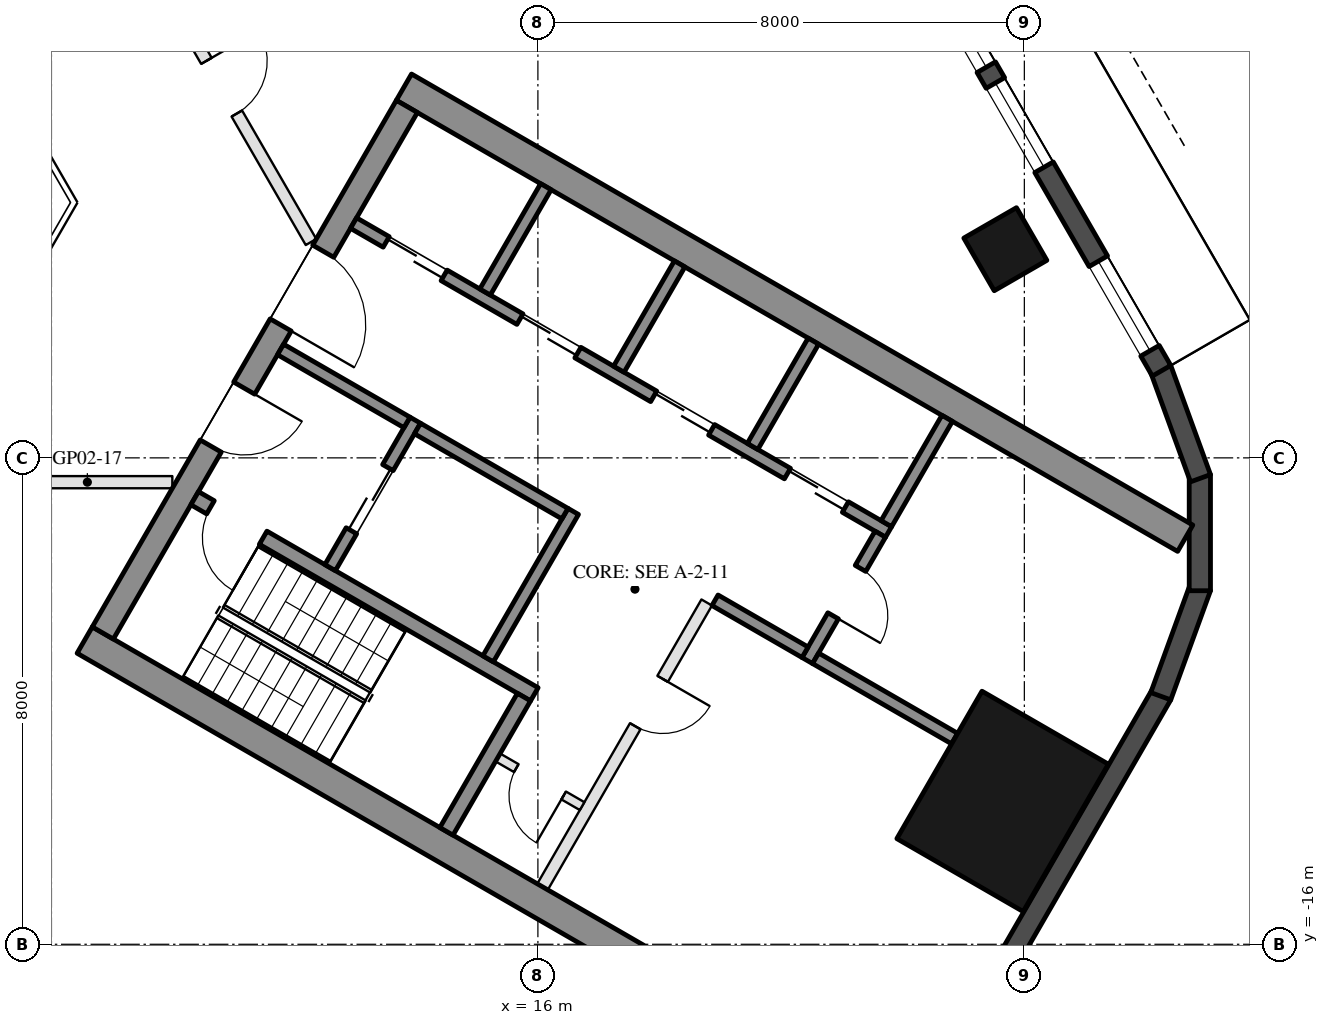
"""IFC4 building model, lengths in metres.
Left out: names, types, materials, properties, quantities, classifications, styles, units other than length and angle.
Written with IfcOpenShell. Run it as: python <this file> out.ifc"""

import sys

from ifc_helpers import new_model, si_unit, direction, frame, frame_2d, origin, origin_2d, place, context, subcontext, project, spatial, rectangle, hollow_rectangle, extrude, element, fill, save


model = new_model("IFC4")
c1 = context("Model", 3, precision=1e-05, world=origin(), true_north=direction((0.0, 1.0)))
c2 = subcontext(c1, "Body", "Model", "MODEL_VIEW")
j1 = project(units=[si_unit("LENGTHUNIT", "METRE"), si_unit("PLANEANGLEUNIT", "RADIAN")], contexts=[c1])
p1 = place(None, origin())
s1 = spatial("IfcSite", under=j1, at=p1, CompositionType="ELEMENT")
p2 = place(p1, origin())
s2 = spatial("IfcBuilding", under=s1, at=p2, CompositionType="ELEMENT")
p3 = place(p2, frame((0.0, 0.0, 53.9)))
s3 = spatial("IfcBuildingStorey", under=s2, at=p3, CompositionType="ELEMENT", Elevation=53.9)
p4 = place(p3, frame((23.688, -4.568, 0.0), z_axis=(0.0, 0.0, 1.0), x_axis=(-0.5, 0.866025403784, 0.0)))
e1 = element("IfcColumn", 1, at=p4, inside=s3, PredefinedType="COLUMN", context=c2, shape_type="SweptSolid", body=[
    extrude(hollow_rectangle(XDim=1.0, YDim=1.0, WallThickness=0.045, at=origin_2d()), origin(), (0.0, 0.0, 1.0), 3.7),
])
p5 = place(p3, frame((23.643, -13.65, 0.0), z_axis=(0.0, 0.0, 1.0), x_axis=(0.5, 0.866025403784, 0.0)))
e2 = element("IfcColumn", 2, at=p5, inside=s3, PredefinedType="COLUMN", context=c2, shape_type="SweptSolid", body=[
    extrude(hollow_rectangle(XDim=2.8, YDim=2.4, WallThickness=0.07, at=origin_2d()), origin(), (0.0, 0.0, 1.0), 3.7),
])
p6 = place(p3, frame((23.427, -16.792, 0.0), z_axis=(0.0, 0.0, 1.0), x_axis=(0.500018773155, 0.866014564827, 0.0)))
e3 = element("IfcWall", 3, at=p6, inside=s3, PredefinedType="SOLIDWALL", context=c2, shape_type="SweptSolid", body=[
    extrude(rectangle(XDim=5.658, YDim=0.35, at=frame_2d((2.829, 0.0))), origin(), (0.0, 0.0, 1.0), 3.55),
])
for number, where, z_axis, x_axis in (
    (4, (26.244, -11.92, 0.0), (0.0, 0.0, 1.0), (0.342, 0.94, 0.0)),
    (5, (26.886, -10.185, 0.0), (0.0, 0.0, 1.0), (0.0, 1.0, 0.0)),
    (6, (26.897, -8.335, 0.0), (0.0, 0.0, 1.0), (-0.342, 0.94, 0.0)),
):
    element("IfcWall", number, at=place(p3, frame(where, z_axis=z_axis, x_axis=x_axis)), inside=s3, PredefinedType="SOLIDWALL", context=c2, shape_type="SweptSolid", body=[
        extrude(rectangle(XDim=1.91, YDim=0.35, at=frame_2d((0.955, 0.0))), origin(), (0.0, 0.0, 1.0), 3.55),
    ])
p7 = place(p3, frame((26.257, -6.567, 0.0), z_axis=(0.0, 0.0, 1.0), x_axis=(-0.500023526245, 0.866011820475, 0.0)))
e7 = element("IfcWall", 7, at=p7, inside=s3, PredefinedType="SOLIDWALL", context=c2, shape_type="SweptSolid", body=[
    extrude(rectangle(XDim=11.816, YDim=0.35, at=frame_2d((5.908, 0.0))), origin(), (0.0, 0.0, 1.0), 3.55),
])
p8 = place(p7, frame((0.38, 0.0, 0.3)))
e8 = element("IfcOpeningElement", 8, at=p8, cuts=e7, PredefinedType="OPENING", context=c2, shape_type="SweptSolid", body=[
    extrude(rectangle(XDim=1.7, YDim=2.65, at=frame_2d((0.85, 1.325))), frame((0.0, 0.185, 0.0), z_axis=(0.0, -1.0, 0.0), x_axis=(1.0, 0.0, 0.0)), (0.0, 0.0, 1.0), 0.37),
])
p9 = place(p7, frame((7.666, 0.0, 0.0)))
e9 = element("IfcOpeningElement", 9, at=p9, cuts=e7, PredefinedType="OPENING", context=c2, shape_type="SweptSolid", body=[
    extrude(rectangle(XDim=2.4, YDim=2.4, at=frame_2d((1.2, 1.2))), frame((0.0, 0.185, 0.0), z_axis=(0.0, -1.0, 0.0), x_axis=(1.0, 0.0, 0.0)), (0.0, 0.0, 1.0), 0.37),
])
p10 = place(p7, frame((3.865, 0.0, 0.3)))
e10 = element("IfcOpeningElement", 10, at=p10, cuts=e7, PredefinedType="OPENING", context=c2, shape_type="SweptSolid", body=[
    extrude(rectangle(XDim=1.6, YDim=2.65, at=frame_2d((0.8, 1.325))), frame((0.0, 0.185, 0.0), z_axis=(0.0, -1.0, 0.0), x_axis=(1.0, 0.0, 0.0)), (0.0, 0.0, 1.0), 0.37),
])
p11 = place(p7, frame((5.765, 0.0, 0.3)))
e11 = element("IfcOpeningElement", 11, at=p11, cuts=e7, PredefinedType="OPENING", context=c2, shape_type="SweptSolid", body=[
    extrude(rectangle(XDim=1.6, YDim=2.65, at=frame_2d((0.8, 1.325))), frame((0.0, 0.185, 0.0), z_axis=(0.0, -1.0, 0.0), x_axis=(1.0, 0.0, 0.0)), (0.0, 0.0, 1.0), 0.37),
])
for number, where, z_axis, x_axis in (
    (12, (8.547, -10.997, 0.0), (0.0, 0.0, 1.0), (0.866, -0.5, 0.0)),
    (13, (13.797, -1.903, 0.0), (0.0, 0.0, 1.0), (0.866, -0.5, 0.0)),
):
    element("IfcWall", number, at=place(p3, frame(where, z_axis=z_axis, x_axis=x_axis)), inside=s3, PredefinedType="SHEAR", context=c2, shape_type="SweptSolid", body=[
        extrude(rectangle(XDim=14.837, YDim=0.5, at=frame_2d((7.418, 0.0))), origin(), (0.0, 0.0, 1.0), 3.5),
    ])
p12 = place(p3, frame((8.845, -10.88, 0.0), z_axis=(0.0, 0.0, 1.0), x_axis=(0.500004234368, 0.866022959057, 0.0)))
e14 = element("IfcWall", 14, at=p12, inside=s3, PredefinedType="SHEAR", context=c2, shape_type="SweptSolid", body=[
    extrude(rectangle(XDim=10.0, YDim=0.4, at=frame_2d((5.0, 0.0))), origin(), (0.0, 0.0, 1.0), 3.5),
])
p13 = place(p12, frame((3.55, 0.0, 0.0)))
e15 = element("IfcOpeningElement", 15, at=p13, cuts=e14, PredefinedType="OPENING", context=c2, shape_type="SweptSolid", body=[
    extrude(rectangle(XDim=1.1, YDim=2.1, at=frame_2d((0.55, 1.05))), frame((0.0, 0.21, 0.0), z_axis=(0.0, -1.0, 0.0), x_axis=(1.0, 0.0, 0.0)), (0.0, 0.0, 1.0), 0.42),
])
p14 = place(p12, frame((5.85, 0.0, 0.0)))
e16 = element("IfcOpeningElement", 16, at=p14, cuts=e14, PredefinedType="OPENING", context=c2, shape_type="SweptSolid", body=[
    extrude(rectangle(XDim=1.4, YDim=2.1, at=frame_2d((0.7, 1.05))), frame((0.0, 0.21, 0.0), z_axis=(0.0, -1.0, 0.0), x_axis=(1.0, 0.0, 0.0)), (0.0, 0.0, 1.0), 0.42),
])
p15 = place(p3, frame((10.356, -8.664, 0.0), z_axis=(0.0, 0.0, 1.0), x_axis=(0.866028629588, -0.499994412703, 0.0)))
e17 = element("IfcWall", 17, at=p15, inside=s3, PredefinedType="SHEAR", context=c2, shape_type="SweptSolid", body=[
    extrude(rectangle(XDim=6.45, YDim=0.25, at=frame_2d((3.225, 0.0))), origin(), (0.0, 0.0, 1.0), 3.5),
])
p16 = place(p15, frame((0.3, 0.0, 0.0)))
e18 = element("IfcOpeningElement", 18, at=p16, cuts=e17, PredefinedType="OPENING", context=c2, shape_type="SweptSolid", body=[
    extrude(rectangle(XDim=1.0, YDim=2.1, at=frame_2d((0.5, 1.05))), frame((0.0, 0.135, 0.0), z_axis=(0.0, -1.0, 0.0), x_axis=(1.0, 0.0, 0.0)), (0.0, 0.0, 1.0), 0.27),
])
p17 = place(p3, frame((14.496, -14.143, 0.0), z_axis=(0.0, 0.0, 1.0), x_axis=(0.500062241894, 0.865989465428, 0.0)))
e19 = element("IfcWall", 19, at=p17, inside=s3, PredefinedType="SHEAR", context=c2, shape_type="SweptSolid", body=[
    extrude(rectangle(XDim=2.55, YDim=0.25, at=frame_2d((1.275, 0.0))), origin(), (0.0, 0.0, 1.0), 3.5),
])
p18 = place(p3, frame((15.181, -11.305, 0.0), z_axis=(0.0, 0.0, 1.0), x_axis=(0.49994636267, 0.866056369097, 0.0)))
e20 = element("IfcWall", 20, at=p18, inside=s3, PredefinedType="SHEAR", context=c2, shape_type="SweptSolid", body=[
    extrude(rectangle(XDim=2.8, YDim=0.2, at=frame_2d((1.4, 0.0))), origin(), (0.0, 0.0, 1.0), 3.5),
])
p19 = place(p3, frame((12.583, -9.805, 0.0), z_axis=(0.0, 0.0, 1.0), x_axis=(0.49994636267, 0.866056369097, 0.0)))
e21 = element("IfcWall", 21, at=p19, inside=s3, PredefinedType="SHEAR", context=c2, shape_type="SweptSolid", body=[
    extrude(rectangle(XDim=2.8, YDim=0.2, at=frame_2d((1.4, 0.0))), origin(), (0.0, 0.0, 1.0), 3.5),
])
p20 = place(p19, frame((0.7, 0.0, 0.0)))
e22 = element("IfcOpeningElement", 22, at=p20, cuts=e21, PredefinedType="OPENING", context=c2, shape_type="SweptSolid", body=[
    extrude(rectangle(XDim=1.2, YDim=2.1, at=frame_2d((0.6, 1.05))), frame((0.0, 0.11, 0.0), z_axis=(0.0, -1.0, 0.0), x_axis=(1.0, 0.0, 0.0)), (0.0, 0.0, 1.0), 0.22),
])
p21 = place(p3, frame((11.768, -6.217, 0.0), z_axis=(0.0, 0.0, 1.0), x_axis=(0.866050077142, -0.499957262057, 0.0)))
e23 = element("IfcWall", 23, at=p21, inside=s3, PredefinedType="SHEAR", context=c2, shape_type="SweptSolid", body=[
    extrude(rectangle(XDim=2.4, YDim=0.2, at=frame_2d((1.2, 0.0))), origin(), (0.0, 0.0, 1.0), 3.5),
])
p22 = place(p3, frame((14.02, -7.517, 0.0), z_axis=(0.0, 0.0, 1.0), x_axis=(0.866034573852, -0.49998411664, 0.0)))
e24 = element("IfcWall", 24, at=p22, inside=s3, PredefinedType="SHEAR", context=c2, shape_type="SweptSolid", body=[
    extrude(rectangle(XDim=2.8, YDim=0.2, at=frame_2d((1.4, 0.0))), origin(), (0.0, 0.0, 1.0), 3.5),
])
p23 = place(p3, frame((12.968, -4.138, 0.0), z_axis=(0.0, 0.0, 1.0), x_axis=(0.866028328073, -0.49999493495, 0.0)))
e25 = element("IfcWall", 25, at=p23, inside=s3, PredefinedType="SHEAR", context=c2, shape_type="SweptSolid", body=[
    extrude(rectangle(XDim=10.16, YDim=0.2, at=frame_2d((5.08, 0.0))), origin(), (0.0, 0.0, 1.0), 3.5),
])
p24 = place(p23, frame((0.62, 0.0, 0.0)))
e26 = element("IfcOpeningElement", 26, at=p24, cuts=e25, PredefinedType="OPENING", context=c2, shape_type="SweptSolid", body=[
    extrude(rectangle(XDim=1.1, YDim=2.1, at=frame_2d((0.55, 1.05))), frame((0.0, 0.11, 0.0), z_axis=(0.0, -1.0, 0.0), x_axis=(1.0, 0.0, 0.0)), (0.0, 0.0, 1.0), 0.22),
])
p25 = place(p23, frame((3.16, 0.0, 0.0)))
e27 = element("IfcOpeningElement", 27, at=p25, cuts=e25, PredefinedType="OPENING", context=c2, shape_type="SweptSolid", body=[
    extrude(rectangle(XDim=1.1, YDim=2.1, at=frame_2d((0.55, 1.05))), frame((0.0, 0.11, 0.0), z_axis=(0.0, -1.0, 0.0), x_axis=(1.0, 0.0, 0.0)), (0.0, 0.0, 1.0), 0.22),
])
p26 = place(p23, frame((5.7, 0.0, 0.0)))
e28 = element("IfcOpeningElement", 28, at=p26, cuts=e25, PredefinedType="OPENING", context=c2, shape_type="SweptSolid", body=[
    extrude(rectangle(XDim=1.1, YDim=2.1, at=frame_2d((0.55, 1.05))), frame((0.0, 0.11, 0.0), z_axis=(0.0, -1.0, 0.0), x_axis=(1.0, 0.0, 0.0)), (0.0, 0.0, 1.0), 0.22),
])
p27 = place(p23, frame((8.24, 0.0, 0.0)))
e29 = element("IfcOpeningElement", 29, at=p27, cuts=e25, PredefinedType="OPENING", context=c2, shape_type="SweptSolid", body=[
    extrude(rectangle(XDim=1.1, YDim=2.1, at=frame_2d((0.55, 1.05))), frame((0.0, 0.11, 0.0), z_axis=(0.0, -1.0, 0.0), x_axis=(1.0, 0.0, 0.0)), (0.0, 0.0, 1.0), 0.22),
])
p28 = place(p3, frame((20.43, -11.333, 0.0), z_axis=(0.0, 0.0, 1.0), x_axis=(0.500001309137, 0.866024647952, 0.0)))
e30 = element("IfcWall", 30, at=p28, inside=s3, PredefinedType="SHEAR", context=c2, shape_type="SweptSolid", body=[
    extrude(rectangle(XDim=2.4, YDim=0.2, at=frame_2d((1.2, 0.0))), origin(), (0.0, 0.0, 1.0), 3.5),
])
p29 = place(p28, frame((0.85, 0.0, 0.0)))
e31 = element("IfcOpeningElement", 31, at=p29, cuts=e30, PredefinedType="OPENING", context=c2, shape_type="SweptSolid", body=[
    extrude(rectangle(XDim=0.9, YDim=2.1, at=frame_2d((0.45, 1.05))), frame((0.0, 0.11, 0.0), z_axis=(0.0, -1.0, 0.0), x_axis=(1.0, 0.0, 0.0)), (0.0, 0.0, 1.0), 0.22),
])
p30 = place(p3, frame((18.913, -10.342, 0.0), z_axis=(0.0, 0.0, 1.0), x_axis=(0.866038183914, -0.499977863513, 0.0)))
e32 = element("IfcWall", 32, at=p30, inside=s3, PredefinedType="SHEAR", context=c2, shape_type="SweptSolid", body=[
    extrude(rectangle(XDim=1.71, YDim=0.2, at=frame_2d((0.855, 0.0))), origin(), (0.0, 0.0, 1.0), 3.5),
])
for number, where, z_axis, x_axis in (
    (33, (15.131, -5.272, 0.0), (0.0, 0.0, 1.0), (0.5, 0.866, 0.0)),
    (34, (17.331, -6.542, 0.0), (0.0, 0.0, 1.0), (0.5, 0.866, 0.0)),
    (35, (19.531, -7.812, 0.0), (0.0, 0.0, 1.0), (0.5, 0.866, 0.0)),
    (36, (21.73, -9.082, 0.0), (0.0, 0.0, 1.0), (0.5, 0.866, 0.0)),
):
    element("IfcWall", number, at=place(p3, frame(where, z_axis=z_axis, x_axis=x_axis)), inside=s3, PredefinedType="SHEAR", context=c2, shape_type="SweptSolid", body=[
        extrude(rectangle(XDim=2.0, YDim=0.2, at=frame_2d((1.0, 0.0))), origin(), (0.0, 0.0, 1.0), 3.5),
    ])
p31 = place(p3, frame((20.567, -11.297, 0.0), z_axis=(0.0, 0.0, 1.0), x_axis=(0.866060851709, -0.499938597367, 0.0)))
e37 = element("IfcWall", 37, at=p31, inside=s3, PredefinedType="SHEAR", context=c2, shape_type="SweptSolid", body=[
    extrude(rectangle(XDim=2.64, YDim=0.2, at=frame_2d((1.32, 0.0))), origin(), (0.0, 0.0, 1.0), 3.5),
])
p32 = place(p3, frame((16.076, -15.055, 0.0), z_axis=(0.0, 0.0, 1.0), x_axis=(0.499995103361, 0.866028230842, 0.0)))
e38 = element("IfcWall", 38, at=p32, inside=s3, PredefinedType="PARTITIONING", context=c2, shape_type="SweptSolid", body=[
    extrude(rectangle(XDim=5.4, YDim=0.2, at=frame_2d((2.7, 0.0))), origin(), (0.0, 0.0, 1.0), 3.5),
])
p33 = place(p32, frame((3.05, 0.0, 0.0)))
e39 = element("IfcOpeningElement", 39, at=p33, cuts=e38, PredefinedType="OPENING", context=c2, shape_type="SweptSolid", body=[
    extrude(rectangle(XDim=0.9, YDim=2.1, at=frame_2d((0.45, 1.05))), frame((0.0, 0.11, 0.0), z_axis=(0.0, -1.0, 0.0), x_axis=(1.0, 0.0, 0.0)), (0.0, 0.0, 1.0), 0.22),
])
p34 = place(p3, frame((15.342, -12.928, 0.0), z_axis=(0.0, 0.0, 1.0), x_axis=(0.865989903783, -0.500061482766, 0.0)))
e40 = element("IfcWall", 40, at=p34, inside=s3, PredefinedType="PARTITIONING", context=c2, shape_type="SweptSolid", body=[
    extrude(rectangle(XDim=1.6, YDim=0.15, at=frame_2d((0.8, 0.0))), origin(), (0.0, 0.0, 1.0), 3.5),
])
p35 = place(p34, frame((0.35, 0.0, 0.0)))
e41 = element("IfcOpeningElement", 41, at=p35, cuts=e40, PredefinedType="OPENING", context=c2, shape_type="SweptSolid", body=[
    extrude(rectangle(XDim=0.9, YDim=2.1, at=frame_2d((0.45, 1.05))), frame((0.0, 0.085, 0.0), z_axis=(0.0, -1.0, 0.0), x_axis=(1.0, 0.0, 0.0)), (0.0, 0.0, 1.0), 0.17),
])
p36 = place(p3, frame((9.988, -8.4, 0.0), z_axis=(0.0, 0.0, 1.0), x_axis=(-1.0, 0.0, 0.0)))
e42 = element("IfcWall", 42, at=p36, inside=s3, PredefinedType="PARTITIONING", context=c2, shape_type="SweptSolid", body=[
    extrude(rectangle(XDim=6.988, YDim=0.2, at=frame_2d((3.494, 0.0))), origin(), (0.0, 0.0, 1.0), 2.95),
])
p37 = place(p36, frame((2.994, 0.0, 0.0)))
e43 = element("IfcOpeningElement", 43, at=p37, cuts=e42, PredefinedType="OPENING", context=c2, shape_type="SweptSolid", body=[
    extrude(rectangle(XDim=1.0, YDim=2.1, at=frame_2d((0.5, 1.05))), frame((0.0, 0.11, 0.0), z_axis=(0.0, -1.0, 0.0), x_axis=(1.0, 0.0, 0.0)), (0.0, 0.0, 1.0), 0.22),
])
p38 = place(p3, frame((9.329, 0.643, 0.0), z_axis=(0.0, 0.0, 1.0), x_axis=(0.500001579811, -0.866024491678, 0.0)))
e44 = element("IfcWall", 44, at=p38, inside=s3, PredefinedType="PARTITIONING", context=c2, shape_type="SweptSolid", body=[
    extrude(rectangle(XDim=5.88, YDim=0.2, at=frame_2d((2.94, 0.0))), origin(), (0.0, 0.0, 1.0), 2.95),
])
p39 = place(p38, frame((2.44, 0.0, 0.0)))
e45 = element("IfcOpeningElement", 45, at=p39, cuts=e44, PredefinedType="OPENING", context=c2, shape_type="SweptSolid", body=[
    extrude(rectangle(XDim=1.0, YDim=2.1, at=frame_2d((0.5, 1.05))), frame((0.0, 0.11, 0.0), z_axis=(0.0, -1.0, 0.0), x_axis=(1.0, 0.0, 0.0)), (0.0, 0.0, 1.0), 0.22),
])
p40 = place(p8, origin())
e46 = element("IfcWindow", 46, at=p40, inside=s3, PartitioningType="SINGLE_PANEL", PredefinedType="WINDOW", context=c2, shape_type="SweptSolid", body=[
    extrude(rectangle(XDim=1.7, YDim=2.65, at=frame_2d((0.85, 1.325))), frame((0.0, 0.03, 0.0), z_axis=(0.0, -1.0, 0.0), x_axis=(1.0, 0.0, 0.0)), (0.0, 0.0, 1.0), 0.06),
])
fill(e8, e46)
p41 = place(p10, origin())
e47 = element("IfcWindow", 47, at=p41, inside=s3, PartitioningType="SINGLE_PANEL", PredefinedType="WINDOW", context=c2, shape_type="SweptSolid", body=[
    extrude(rectangle(XDim=1.6, YDim=2.65, at=frame_2d((0.8, 1.325))), frame((0.0, 0.03, 0.0), z_axis=(0.0, -1.0, 0.0), x_axis=(1.0, 0.0, 0.0)), (0.0, 0.0, 1.0), 0.06),
])
fill(e10, e47)
p42 = place(p11, origin())
e48 = element("IfcWindow", 48, at=p42, inside=s3, PartitioningType="SINGLE_PANEL", PredefinedType="WINDOW", context=c2, shape_type="SweptSolid", body=[
    extrude(rectangle(XDim=1.6, YDim=2.65, at=frame_2d((0.8, 1.325))), frame((0.0, 0.03, 0.0), z_axis=(0.0, -1.0, 0.0), x_axis=(1.0, 0.0, 0.0)), (0.0, 0.0, 1.0), 0.06),
])
fill(e11, e48)
p43 = place(p20, origin())
e49 = element("IfcDoor", 49, at=p43, inside=s3, OperationType="DOUBLE_DOOR_SLIDING", PredefinedType="DOOR", context=c2, shape_type="SweptSolid", body=[
    extrude(rectangle(XDim=1.2, YDim=2.1, at=frame_2d((0.6, 1.05))), frame((0.0, 0.025, 0.0), z_axis=(0.0, -1.0, 0.0), x_axis=(1.0, 0.0, 0.0)), (0.0, 0.0, 1.0), 0.05),
])
fill(e22, e49)
p44 = place(p35, frame((0.9, 0.0, 0.0), z_axis=(0.0, 0.0, 1.0), x_axis=(-1.0, 0.0, 0.0)))
e50 = element("IfcDoor", 50, at=p44, inside=s3, OperationType="SINGLE_SWING_LEFT", PredefinedType="DOOR", context=c2, shape_type="SweptSolid", body=[
    extrude(rectangle(XDim=0.9, YDim=2.1, at=frame_2d((0.45, 1.05))), frame((0.0, 0.025, 0.0), z_axis=(0.0, -1.0, 0.0), x_axis=(1.0, 0.0, 0.0)), (0.0, 0.0, 1.0), 0.05),
])
fill(e41, e50)
p45 = place(p24, origin())
e51 = element("IfcDoor", 51, at=p45, inside=s3, OperationType="DOUBLE_DOOR_SLIDING", PredefinedType="DOOR", context=c2, shape_type="SweptSolid", body=[
    extrude(rectangle(XDim=1.1, YDim=2.1, at=frame_2d((0.55, 1.05))), frame((0.0, 0.025, 0.0), z_axis=(0.0, -1.0, 0.0), x_axis=(1.0, 0.0, 0.0)), (0.0, 0.0, 1.0), 0.05),
])
fill(e26, e51)
p46 = place(p25, origin())
e52 = element("IfcDoor", 52, at=p46, inside=s3, OperationType="DOUBLE_DOOR_SLIDING", PredefinedType="DOOR", context=c2, shape_type="SweptSolid", body=[
    extrude(rectangle(XDim=1.1, YDim=2.1, at=frame_2d((0.55, 1.05))), frame((0.0, 0.025, 0.0), z_axis=(0.0, -1.0, 0.0), x_axis=(1.0, 0.0, 0.0)), (0.0, 0.0, 1.0), 0.05),
])
fill(e27, e52)
p47 = place(p26, origin())
e53 = element("IfcDoor", 53, at=p47, inside=s3, OperationType="DOUBLE_DOOR_SLIDING", PredefinedType="DOOR", context=c2, shape_type="SweptSolid", body=[
    extrude(rectangle(XDim=1.1, YDim=2.1, at=frame_2d((0.55, 1.05))), frame((0.0, 0.025, 0.0), z_axis=(0.0, -1.0, 0.0), x_axis=(1.0, 0.0, 0.0)), (0.0, 0.0, 1.0), 0.05),
])
fill(e28, e53)
p48 = place(p27, origin())
e54 = element("IfcDoor", 54, at=p48, inside=s3, OperationType="DOUBLE_DOOR_SLIDING", PredefinedType="DOOR", context=c2, shape_type="SweptSolid", body=[
    extrude(rectangle(XDim=1.1, YDim=2.1, at=frame_2d((0.55, 1.05))), frame((0.0, 0.025, 0.0), z_axis=(0.0, -1.0, 0.0), x_axis=(1.0, 0.0, 0.0)), (0.0, 0.0, 1.0), 0.05),
])
fill(e29, e54)
p49 = place(p29, frame((0.9, 0.0, 0.0), z_axis=(0.0, 0.0, 1.0), x_axis=(-1.0, 0.0, 0.0)))
e55 = element("IfcDoor", 55, at=p49, inside=s3, OperationType="SINGLE_SWING_RIGHT", PredefinedType="DOOR", context=c2, shape_type="SweptSolid", body=[
    extrude(rectangle(XDim=0.9, YDim=2.1, at=frame_2d((0.45, 1.05))), frame((0.0, 0.025, 0.0), z_axis=(0.0, -1.0, 0.0), x_axis=(1.0, 0.0, 0.0)), (0.0, 0.0, 1.0), 0.05),
])
fill(e31, e55)
p50 = place(p33, frame((0.9, 0.0, 0.0), z_axis=(0.0, 0.0, 1.0), x_axis=(-1.0, 0.0, 0.0)))
e56 = element("IfcDoor", 56, at=p50, inside=s3, OperationType="SINGLE_SWING_LEFT", PredefinedType="DOOR", context=c2, shape_type="SweptSolid", body=[
    extrude(rectangle(XDim=0.9, YDim=2.1, at=frame_2d((0.45, 1.05))), frame((0.0, 0.025, 0.0), z_axis=(0.0, -1.0, 0.0), x_axis=(1.0, 0.0, 0.0)), (0.0, 0.0, 1.0), 0.05),
])
fill(e39, e56)
p51 = place(p13, frame((1.1, 0.0, 0.0), z_axis=(0.0, 0.0, 1.0), x_axis=(-1.0, 0.0, 0.0)))
e57 = element("IfcDoor", 57, at=p51, inside=s3, OperationType="SINGLE_SWING_LEFT", PredefinedType="DOOR", context=c2, shape_type="SweptSolid", body=[
    extrude(rectangle(XDim=1.1, YDim=2.1, at=frame_2d((0.55, 1.05))), frame((0.0, 0.025, 0.0), z_axis=(0.0, -1.0, 0.0), x_axis=(1.0, 0.0, 0.0)), (0.0, 0.0, 1.0), 0.05),
])
fill(e15, e57)
p52 = place(p14, frame((1.4, 0.0, 0.0), z_axis=(0.0, 0.0, 1.0), x_axis=(-1.0, 0.0, 0.0)))
e58 = element("IfcDoor", 58, at=p52, inside=s3, OperationType="DOUBLE_DOOR_SINGLE_SWING", PredefinedType="DOOR", context=c2, shape_type="SweptSolid", body=[
    extrude(rectangle(XDim=1.4, YDim=2.1, at=frame_2d((0.7, 1.05))), frame((0.0, 0.025, 0.0), z_axis=(0.0, -1.0, 0.0), x_axis=(1.0, 0.0, 0.0)), (0.0, 0.0, 1.0), 0.05),
])
fill(e16, e58)
p53 = place(p16, frame((1.0, 0.0, 0.0), z_axis=(0.0, 0.0, 1.0), x_axis=(-1.0, 0.0, 0.0)))
e59 = element("IfcDoor", 59, at=p53, inside=s3, OperationType="SINGLE_SWING_LEFT", PredefinedType="DOOR", context=c2, shape_type="SweptSolid", body=[
    extrude(rectangle(XDim=1.0, YDim=2.1, at=frame_2d((0.5, 1.05))), frame((0.0, 0.025, 0.0), z_axis=(0.0, -1.0, 0.0), x_axis=(1.0, 0.0, 0.0)), (0.0, 0.0, 1.0), 0.05),
])
fill(e18, e59)
p54 = place(p39, origin())
e60 = element("IfcDoor", 60, at=p54, inside=s3, OperationType="SINGLE_SWING_LEFT", PredefinedType="DOOR", context=c2, shape_type="SweptSolid", body=[
    extrude(rectangle(XDim=1.0, YDim=2.1, at=frame_2d((0.5, 1.05))), frame((0.0, 0.025, 0.0), z_axis=(0.0, -1.0, 0.0), x_axis=(1.0, 0.0, 0.0)), (0.0, 0.0, 1.0), 0.05),
])
fill(e45, e60)
save(model, sys.argv[1])
